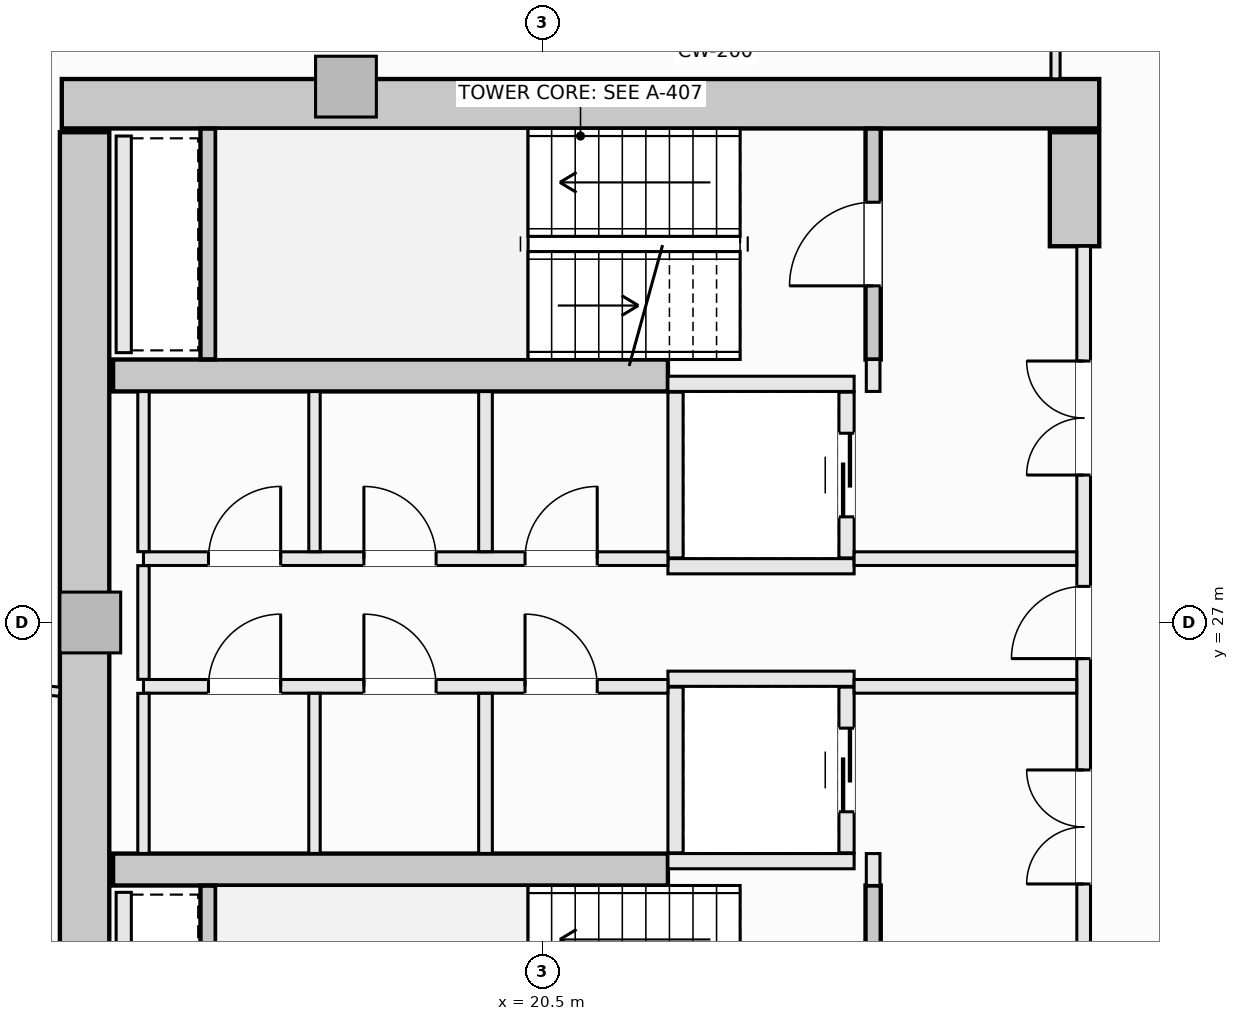
"""IFC4 building model, lengths in metres.
Left out: names, types, materials, properties, quantities, classifications, styles, units other than length and angle.
Written with IfcOpenShell. Run it as: python <this file> out.ifc"""

import sys

from ifc_helpers import new_model, si_unit, direction, frame, frame_2d, origin, origin_2d, place, context, subcontext, project, spatial, rectangle, extrude, element, fill, save


model = new_model("IFC4")
c1 = context("Model", 3, precision=1e-05, world=origin(), true_north=direction((0.0, 1.0)))
c2 = subcontext(c1, "Body", "Model", "MODEL_VIEW")
j1 = project(units=[si_unit("LENGTHUNIT", "METRE"), si_unit("PLANEANGLEUNIT", "RADIAN")], contexts=[c1])
p1 = place(None, origin())
s1 = spatial("IfcSite", under=j1, at=p1, CompositionType="ELEMENT")
p2 = place(p1, origin())
s2 = spatial("IfcBuilding", under=s1, at=p2, CompositionType="ELEMENT")
p3 = place(p2, frame((0.0, 0.0, 112.1)))
s3 = spatial("IfcBuildingStorey", under=s2, at=p3, CompositionType="ELEMENT", Elevation=112.1)
p4 = place(p3, frame((14.175, 33.825, -0.27), z_axis=(0.0, 0.0, 1.0), x_axis=(1.0, 0.0, 0.0)))
e1 = element("IfcWall", 1, at=p4, inside=s3, PredefinedType="SHEAR", context=c2, shape_type="SweptSolid", body=[
    extrude(rectangle(XDim=13.65, YDim=0.65, at=frame_2d((6.825, 0.0))), origin(), (0.0, 0.0, 1.0), 3.4),
])
p5 = place(p3, frame((14.475, 20.55, -0.27), z_axis=(0.0, 0.0, 1.0), x_axis=(0.0, 1.0, 0.0)))
e2 = element("IfcWall", 2, at=p5, inside=s3, PredefinedType="SHEAR", context=c2, shape_type="SweptSolid", body=[
    extrude(rectangle(XDim=12.9, YDim=0.65, at=frame_2d((6.45, 0.0))), origin(), (0.0, 0.0, 1.0), 3.4),
])
p6 = place(p3, frame((27.5, 31.95, -0.27), z_axis=(0.0, 0.0, 1.0), x_axis=(0.0, 1.0, 0.0)))
e3 = element("IfcWall", 3, at=p6, inside=s3, PredefinedType="SHEAR", context=c2, shape_type="SweptSolid", body=[
    extrude(rectangle(XDim=1.5, YDim=0.65, at=frame_2d((0.75, 0.0))), origin(), (0.0, 0.0, 1.0), 3.4),
])
for number, where, z_axis, x_axis in (
    (4, (14.85, 30.25, -0.27), (0.0, 0.0, 1.0), (1.0, 0.0, 0.0)),
    (5, (14.85, 23.75, -0.27), (0.0, 0.0, 1.0), (1.0, 0.0, 0.0)),
):
    element("IfcWall", number, at=place(p3, frame(where, z_axis=z_axis, x_axis=x_axis)), inside=s3, PredefinedType="SHEAR", context=c2, shape_type="SweptSolid", body=[
        extrude(rectangle(XDim=7.3, YDim=0.42, at=frame_2d((3.65, 0.0))), origin(), (0.0, 0.0, 1.0), 3.4),
    ])
for number, where, z_axis, x_axis in (
    (6, (17.914, 34.05, -0.27), (0.0, 0.0, 1.0), (1.0, 0.0, 0.0)),
    (7, (14.55, 27.0, -0.27), (0.0, 0.0, 1.0), (1.0, 0.0, 0.0)),
):
    element("IfcColumn", number, at=place(p3, frame(where, z_axis=z_axis, x_axis=x_axis)), inside=s3, PredefinedType="PILASTER", context=c2, shape_type="SweptSolid", body=[
        extrude(rectangle(XDim=0.8, YDim=0.8, at=origin_2d()), origin(), (0.0, 0.0, 1.0), 3.4),
    ])
p7 = place(p3, frame((24.85, 30.46, -0.27), z_axis=(0.0, 0.0, 1.0), x_axis=(0.0, 1.0, 0.0)))
e8 = element("IfcWall", 8, at=p7, inside=s3, PredefinedType="SHEAR", context=c2, shape_type="SweptSolid", body=[
    extrude(rectangle(XDim=3.038, YDim=0.2, at=frame_2d((1.519, 0.0))), origin(), (0.0, 0.0, 1.0), 3.4),
])
p8 = place(p7, frame((0.969, 0.0, 0.27)))
e9 = element("IfcOpeningElement", 9, at=p8, cuts=e8, PredefinedType="OPENING", context=c2, shape_type="SweptSolid", body=[
    extrude(rectangle(XDim=1.1, YDim=2.15, at=frame_2d((0.55, 1.075))), frame((0.0, 0.11, 0.0), z_axis=(0.0, -1.0, 0.0), x_axis=(1.0, 0.0, 0.0)), (0.0, 0.0, 1.0), 0.22),
])
p9 = place(p3, frame((16.1, 30.462, -0.27), z_axis=(0.0, 0.0, 1.0), x_axis=(0.0, 1.0, 0.0)))
e10 = element("IfcWall", 10, at=p9, inside=s3, PredefinedType="SHEAR", context=c2, shape_type="SweptSolid", body=[
    extrude(rectangle(XDim=3.036, YDim=0.2, at=frame_2d((1.518, 0.0))), origin(), (0.0, 0.0, 1.0), 3.4),
])
p10 = place(p3, frame((24.85, 20.502, -0.27), z_axis=(0.0, 0.0, 1.0), x_axis=(0.0, 1.0, 0.0)))
e11 = element("IfcWall", 11, at=p10, inside=s3, PredefinedType="SHEAR", context=c2, shape_type="SweptSolid", body=[
    extrude(rectangle(XDim=3.038, YDim=0.2, at=frame_2d((1.519, 0.0))), origin(), (0.0, 0.0, 1.0), 3.4),
])
p11 = place(p10, frame((0.969, 0.0, 0.27)))
e12 = element("IfcOpeningElement", 12, at=p11, cuts=e11, PredefinedType="OPENING", context=c2, shape_type="SweptSolid", body=[
    extrude(rectangle(XDim=1.1, YDim=2.15, at=frame_2d((0.55, 1.075))), frame((0.0, 0.11, 0.0), z_axis=(0.0, -1.0, 0.0), x_axis=(1.0, 0.0, 0.0)), (0.0, 0.0, 1.0), 0.22),
])
p12 = place(p3, frame((16.1, 20.502, -0.27), z_axis=(0.0, 0.0, 1.0), x_axis=(0.0, 1.0, 0.0)))
e13 = element("IfcWall", 13, at=p12, inside=s3, PredefinedType="SHEAR", context=c2, shape_type="SweptSolid", body=[
    extrude(rectangle(XDim=3.036, YDim=0.2, at=frame_2d((1.518, 0.0))), origin(), (0.0, 0.0, 1.0), 3.4),
])
for number, where, z_axis, x_axis in (
    (14, (22.15, 30.14, 0.0), (0.0, 0.0, 1.0), (1.0, 0.0, 0.0)),
    (15, (22.15, 27.74, 0.0), (0.0, 0.0, 1.0), (1.0, 0.0, 0.0)),
):
    element("IfcWall", number, at=place(p3, frame(where, z_axis=z_axis, x_axis=x_axis)), inside=s3, PredefinedType="SOLIDWALL", context=c2, shape_type="SweptSolid", body=[
        extrude(rectangle(XDim=2.45, YDim=0.2, at=frame_2d((1.225, 0.0))), origin(), (0.0, 0.0, 1.0), 3.13),
    ])
p13 = place(p3, frame((22.25, 27.85, 0.0), z_axis=(0.0, 0.0, 1.0), x_axis=(0.0, 1.0, 0.0)))
e16 = element("IfcWall", 16, at=p13, inside=s3, PredefinedType="SOLIDWALL", context=c2, shape_type="SweptSolid", body=[
    extrude(rectangle(XDim=2.18, YDim=0.2, at=frame_2d((1.09, 0.0))), origin(), (0.0, 0.0, 1.0), 3.13),
])
p14 = place(p3, frame((24.5, 27.85, 0.0), z_axis=(0.0, 0.0, 1.0), x_axis=(0.0, 1.0, 0.0)))
e17 = element("IfcWall", 17, at=p14, inside=s3, PredefinedType="SOLIDWALL", context=c2, shape_type="SweptSolid", body=[
    extrude(rectangle(XDim=2.18, YDim=0.2, at=frame_2d((1.09, 0.0))), origin(), (0.0, 0.0, 1.0), 3.13),
])
p15 = place(p14, frame((0.54, 0.0, 0.0)))
e18 = element("IfcOpeningElement", 18, at=p15, cuts=e17, PredefinedType="OPENING", context=c2, shape_type="SweptSolid", body=[
    extrude(rectangle(XDim=1.1, YDim=2.2, at=frame_2d((0.55, 1.1))), frame((0.0, 0.11, 0.0), z_axis=(0.0, -1.0, 0.0), x_axis=(1.0, 0.0, 0.0)), (0.0, 0.0, 1.0), 0.22),
])
for number, where, z_axis, x_axis in (
    (19, (22.15, 26.26, 0.0), (0.0, 0.0, 1.0), (1.0, 0.0, 0.0)),
    (20, (22.15, 23.86, 0.0), (0.0, 0.0, 1.0), (1.0, 0.0, 0.0)),
):
    element("IfcWall", number, at=place(p3, frame(where, z_axis=z_axis, x_axis=x_axis)), inside=s3, PredefinedType="SOLIDWALL", context=c2, shape_type="SweptSolid", body=[
        extrude(rectangle(XDim=2.45, YDim=0.2, at=frame_2d((1.225, 0.0))), origin(), (0.0, 0.0, 1.0), 3.13),
    ])
p16 = place(p3, frame((22.25, 23.97, 0.0), z_axis=(0.0, 0.0, 1.0), x_axis=(0.0, 1.0, 0.0)))
e21 = element("IfcWall", 21, at=p16, inside=s3, PredefinedType="SOLIDWALL", context=c2, shape_type="SweptSolid", body=[
    extrude(rectangle(XDim=2.18, YDim=0.2, at=frame_2d((1.09, 0.0))), origin(), (0.0, 0.0, 1.0), 3.13),
])
p17 = place(p3, frame((24.5, 23.97, 0.0), z_axis=(0.0, 0.0, 1.0), x_axis=(0.0, 1.0, 0.0)))
e22 = element("IfcWall", 22, at=p17, inside=s3, PredefinedType="SOLIDWALL", context=c2, shape_type="SweptSolid", body=[
    extrude(rectangle(XDim=2.18, YDim=0.2, at=frame_2d((1.09, 0.0))), origin(), (0.0, 0.0, 1.0), 3.13),
])
p18 = place(p17, frame((0.54, 0.0, 0.0)))
e23 = element("IfcOpeningElement", 23, at=p18, cuts=e22, PredefinedType="OPENING", context=c2, shape_type="SweptSolid", body=[
    extrude(rectangle(XDim=1.1, YDim=2.2, at=frame_2d((0.55, 1.1))), frame((0.0, 0.11, 0.0), z_axis=(0.0, -1.0, 0.0), x_axis=(1.0, 0.0, 0.0)), (0.0, 0.0, 1.0), 0.22),
])
for number, where, z_axis, x_axis in (
    (24, (14.99, 30.55, 0.0), (0.0, 0.0, 1.0), (0.0, 1.0, 0.0)),
    (25, (14.99, 20.6, 0.0), (0.0, 0.0, 1.0), (0.0, 1.0, 0.0)),
):
    element("IfcWall", number, at=place(p3, frame(where, z_axis=z_axis, x_axis=x_axis)), inside=s3, PredefinedType="SOLIDWALL", context=c2, shape_type="SweptSolid", body=[
        extrude(rectangle(XDim=2.85, YDim=0.2, at=frame_2d((1.425, 0.0))), origin(), (0.0, 0.0, 1.0), 3.13),
    ])
for number, where, z_axis, x_axis in (
    (26, (24.85, 23.54, 0.0), (0.0, 0.0, 1.0), (0.0, 1.0, 0.0)),
    (27, (24.85, 30.04, 0.0), (0.0, 0.0, 1.0), (0.0, 1.0, 0.0)),
):
    element("IfcWall", number, at=place(p3, frame(where, z_axis=z_axis, x_axis=x_axis)), inside=s3, PredefinedType="SOLIDWALL", context=c2, shape_type="SweptSolid", body=[
        extrude(rectangle(XDim=0.42, YDim=0.18, at=frame_2d((0.21, 0.0))), origin(), (0.0, 0.0, 1.0), 3.13),
    ])
p19 = place(p3, frame((27.62, 22.05, 0.0), z_axis=(0.0, 0.0, 1.0), x_axis=(0.0, 1.0, 0.0)))
e28 = element("IfcWall", 28, at=p19, inside=s3, PredefinedType="SOLIDWALL", context=c2, shape_type="SweptSolid", body=[
    extrude(rectangle(XDim=9.9, YDim=0.18, at=frame_2d((4.95, 0.0))), origin(), (0.0, 0.0, 1.0), 3.13),
])
p20 = place(p19, frame((4.475, 0.0, 0.0)))
e29 = element("IfcOpeningElement", 29, at=p20, cuts=e28, PredefinedType="OPENING", context=c2, shape_type="SweptSolid", body=[
    extrude(rectangle(XDim=0.95, YDim=2.1, at=frame_2d((0.475, 1.05))), frame((0.0, 0.1, 0.0), z_axis=(0.0, -1.0, 0.0), x_axis=(1.0, 0.0, 0.0)), (0.0, 0.0, 1.0), 0.2),
])
p21 = place(p19, frame((6.89, 0.0, 0.0)))
e30 = element("IfcOpeningElement", 30, at=p21, cuts=e28, PredefinedType="OPENING", context=c2, shape_type="SweptSolid", body=[
    extrude(rectangle(XDim=1.5, YDim=2.2, at=frame_2d((0.75, 1.1))), frame((0.0, 0.1, 0.0), z_axis=(0.0, -1.0, 0.0), x_axis=(1.0, 0.0, 0.0)), (0.0, 0.0, 1.0), 0.2),
])
p22 = place(p19, frame((1.51, 0.0, 0.0)))
e31 = element("IfcOpeningElement", 31, at=p22, cuts=e28, PredefinedType="OPENING", context=c2, shape_type="SweptSolid", body=[
    extrude(rectangle(XDim=1.5, YDim=2.2, at=frame_2d((0.75, 1.1))), frame((0.0, 0.1, 0.0), z_axis=(0.0, -1.0, 0.0), x_axis=(1.0, 0.0, 0.0)), (0.0, 0.0, 1.0), 0.2),
])
p23 = place(p3, frame((15.25, 27.84, 0.0), z_axis=(0.0, 0.0, 1.0), x_axis=(1.0, 0.0, 0.0)))
e32 = element("IfcWall", 32, at=p23, inside=s3, PredefinedType="SOLIDWALL", context=c2, shape_type="SweptSolid", body=[
    extrude(rectangle(XDim=6.9, YDim=0.18, at=frame_2d((3.45, 0.0))), origin(), (0.0, 0.0, 1.0), 3.13),
])
p24 = place(p23, frame((5.02, 0.0, 0.0)))
e33 = element("IfcOpeningElement", 33, at=p24, cuts=e32, PredefinedType="OPENING", context=c2, shape_type="SweptSolid", body=[
    extrude(rectangle(XDim=0.95, YDim=2.1, at=frame_2d((0.475, 1.05))), frame((0.0, 0.1, 0.0), z_axis=(0.0, -1.0, 0.0), x_axis=(1.0, 0.0, 0.0)), (0.0, 0.0, 1.0), 0.2),
])
p25 = place(p23, frame((0.855, 0.0, 0.0)))
e34 = element("IfcOpeningElement", 34, at=p25, cuts=e32, PredefinedType="OPENING", context=c2, shape_type="SweptSolid", body=[
    extrude(rectangle(XDim=0.95, YDim=2.1, at=frame_2d((0.475, 1.05))), frame((0.0, 0.1, 0.0), z_axis=(0.0, -1.0, 0.0), x_axis=(1.0, 0.0, 0.0)), (0.0, 0.0, 1.0), 0.2),
])
p26 = place(p23, frame((2.9, 0.0, 0.0)))
e35 = element("IfcOpeningElement", 35, at=p26, cuts=e32, PredefinedType="OPENING", context=c2, shape_type="SweptSolid", body=[
    extrude(rectangle(XDim=0.95, YDim=2.1, at=frame_2d((0.475, 1.05))), frame((0.0, 0.1, 0.0), z_axis=(0.0, -1.0, 0.0), x_axis=(1.0, 0.0, 0.0)), (0.0, 0.0, 1.0), 0.2),
])
p27 = place(p3, frame((24.6, 27.84, 0.0), z_axis=(0.0, 0.0, 1.0), x_axis=(1.0, 0.0, 0.0)))
e36 = element("IfcWall", 36, at=p27, inside=s3, PredefinedType="SOLIDWALL", context=c2, shape_type="SweptSolid", body=[
    extrude(rectangle(XDim=2.928, YDim=0.18, at=frame_2d((1.464, 0.0))), origin(), (0.0, 0.0, 1.0), 3.13),
])
p28 = place(p3, frame((15.25, 26.16, 0.0), z_axis=(0.0, 0.0, 1.0), x_axis=(1.0, 0.0, 0.0)))
e37 = element("IfcWall", 37, at=p28, inside=s3, PredefinedType="SOLIDWALL", context=c2, shape_type="SweptSolid", body=[
    extrude(rectangle(XDim=6.9, YDim=0.18, at=frame_2d((3.45, 0.0))), origin(), (0.0, 0.0, 1.0), 3.13),
])
p29 = place(p28, frame((5.02, 0.0, 0.0)))
e38 = element("IfcOpeningElement", 38, at=p29, cuts=e37, PredefinedType="OPENING", context=c2, shape_type="SweptSolid", body=[
    extrude(rectangle(XDim=0.95, YDim=2.1, at=frame_2d((0.475, 1.05))), frame((0.0, 0.1, 0.0), z_axis=(0.0, -1.0, 0.0), x_axis=(1.0, 0.0, 0.0)), (0.0, 0.0, 1.0), 0.2),
])
p30 = place(p28, frame((0.855, 0.0, 0.0)))
e39 = element("IfcOpeningElement", 39, at=p30, cuts=e37, PredefinedType="OPENING", context=c2, shape_type="SweptSolid", body=[
    extrude(rectangle(XDim=0.95, YDim=2.1, at=frame_2d((0.475, 1.05))), frame((0.0, 0.1, 0.0), z_axis=(0.0, -1.0, 0.0), x_axis=(1.0, 0.0, 0.0)), (0.0, 0.0, 1.0), 0.2),
])
p31 = place(p28, frame((2.9, 0.0, 0.0)))
e40 = element("IfcOpeningElement", 40, at=p31, cuts=e37, PredefinedType="OPENING", context=c2, shape_type="SweptSolid", body=[
    extrude(rectangle(XDim=0.95, YDim=2.1, at=frame_2d((0.475, 1.05))), frame((0.0, 0.1, 0.0), z_axis=(0.0, -1.0, 0.0), x_axis=(1.0, 0.0, 0.0)), (0.0, 0.0, 1.0), 0.2),
])
p32 = place(p3, frame((24.6, 26.16, 0.0), z_axis=(0.0, 0.0, 1.0), x_axis=(1.0, 0.0, 0.0)))
e41 = element("IfcWall", 41, at=p32, inside=s3, PredefinedType="SOLIDWALL", context=c2, shape_type="SweptSolid", body=[
    extrude(rectangle(XDim=2.928, YDim=0.18, at=frame_2d((1.464, 0.0))), origin(), (0.0, 0.0, 1.0), 3.13),
])
p33 = place(p3, frame((15.25, 23.962, 0.0), z_axis=(0.0, 0.0, 1.0), x_axis=(0.0, 1.0, 0.0)))
e42 = element("IfcWall", 42, at=p33, inside=s3, PredefinedType="PARTITIONING", context=c2, shape_type="SweptSolid", body=[
    extrude(rectangle(XDim=2.106, YDim=0.15, at=frame_2d((1.053, 0.0))), origin(), (0.0, 0.0, 1.0), 3.13),
])
p34 = place(p3, frame((15.25, 26.252, 0.0), z_axis=(0.0, 0.0, 1.0), x_axis=(0.0, 1.0, 0.0)))
e43 = element("IfcWall", 43, at=p34, inside=s3, PredefinedType="PARTITIONING", context=c2, shape_type="SweptSolid", body=[
    extrude(rectangle(XDim=1.496, YDim=0.15, at=frame_2d((0.748, 0.0))), origin(), (0.0, 0.0, 1.0), 3.13),
])
p35 = place(p3, frame((15.25, 27.932, 0.0), z_axis=(0.0, 0.0, 1.0), x_axis=(0.0, 1.0, 0.0)))
e44 = element("IfcWall", 44, at=p35, inside=s3, PredefinedType="PARTITIONING", context=c2, shape_type="SweptSolid", body=[
    extrude(rectangle(XDim=2.106, YDim=0.15, at=frame_2d((1.053, 0.0))), origin(), (0.0, 0.0, 1.0), 3.13),
])
for number, where, z_axis, x_axis in (
    (45, (19.75, 23.962, 0.0), (0.0, 0.0, 1.0), (0.0, 1.0, 0.0)),
    (46, (19.75, 27.932, 0.0), (0.0, 0.0, 1.0), (0.0, 1.0, 0.0)),
):
    element("IfcWall", number, at=place(p3, frame(where, z_axis=z_axis, x_axis=x_axis)), inside=s3, PredefinedType="SOLIDWALL", context=c2, shape_type="SweptSolid", body=[
        extrude(rectangle(XDim=2.106, YDim=0.18, at=frame_2d((1.053, 0.0))), origin(), (0.0, 0.0, 1.0), 3.13),
    ])
for number, where, z_axis, x_axis in (
    (47, (17.5, 23.962, 0.0), (0.0, 0.0, 1.0), (0.0, 1.0, 0.0)),
    (48, (17.5, 27.932, 0.0), (0.0, 0.0, 1.0), (0.0, 1.0, 0.0)),
):
    element("IfcWall", number, at=place(p3, frame(where, z_axis=z_axis, x_axis=x_axis)), inside=s3, PredefinedType="PARTITIONING", context=c2, shape_type="SweptSolid", body=[
        extrude(rectangle(XDim=2.106, YDim=0.15, at=frame_2d((1.053, 0.0))), origin(), (0.0, 0.0, 1.0), 3.13),
    ])
p36 = place(p3, frame((27.25, 34.152, 0.0), z_axis=(0.0, 0.0, 1.0), x_axis=(0.0, 1.0, 0.0)))
e49 = element("IfcWall", 49, at=p36, inside=s3, PredefinedType="PARTITIONING", context=c2, shape_type="SweptSolid", body=[
    extrude(rectangle(XDim=0.806, YDim=0.12, at=frame_2d((0.403, 0.0))), origin(), (0.0, 0.0, 1.0), 3.13),
])
p37 = place(p3, frame((6.095, 26.981, 0.0), z_axis=(0.0, 0.0, 1.0), x_axis=(0.993917127708, -0.11013057363, 0.0)))
e50 = element("IfcWall", 50, at=p37, inside=s3, PredefinedType="PARTITIONING", context=c2, shape_type="SweptSolid", body=[
    extrude(rectangle(XDim=8.103, YDim=0.12, at=frame_2d((4.051, 0.0))), origin(), (0.0, 0.0, 1.0), 2.505),
])
p38 = place(p8, origin())
e51 = element("IfcDoor", 51, at=p38, inside=s3, OperationType="SINGLE_SWING_LEFT", PredefinedType="DOOR", context=c2, shape_type="SweptSolid", body=[
    extrude(rectangle(XDim=1.1, YDim=2.15, at=frame_2d((0.55, 1.075))), frame((0.0, 0.025, 0.0), z_axis=(0.0, -1.0, 0.0), x_axis=(1.0, 0.0, 0.0)), (0.0, 0.0, 1.0), 0.05),
])
fill(e9, e51)
p39 = place(p15, origin())
e52 = element("IfcDoor", 52, at=p39, inside=s3, OperationType="SLIDING_TO_LEFT", PredefinedType="DOOR", context=c2, shape_type="SweptSolid", body=[
    extrude(rectangle(XDim=1.1, YDim=2.2, at=frame_2d((0.55, 1.1))), frame((0.0, 0.025, 0.0), z_axis=(0.0, -1.0, 0.0), x_axis=(1.0, 0.0, 0.0)), (0.0, 0.0, 1.0), 0.05),
])
fill(e18, e52)
p40 = place(p18, origin())
e53 = element("IfcDoor", 53, at=p40, inside=s3, OperationType="SLIDING_TO_LEFT", PredefinedType="DOOR", context=c2, shape_type="SweptSolid", body=[
    extrude(rectangle(XDim=1.1, YDim=2.2, at=frame_2d((0.55, 1.1))), frame((0.0, 0.025, 0.0), z_axis=(0.0, -1.0, 0.0), x_axis=(1.0, 0.0, 0.0)), (0.0, 0.0, 1.0), 0.05),
])
fill(e23, e53)
p41 = place(p20, origin())
e54 = element("IfcDoor", 54, at=p41, inside=s3, OperationType="SINGLE_SWING_LEFT", PredefinedType="DOOR", context=c2, shape_type="SweptSolid", body=[
    extrude(rectangle(XDim=0.95, YDim=2.1, at=frame_2d((0.475, 1.05))), frame((0.0, 0.025, 0.0), z_axis=(0.0, -1.0, 0.0), x_axis=(1.0, 0.0, 0.0)), (0.0, 0.0, 1.0), 0.05),
])
fill(e29, e54)
p42 = place(p21, origin())
e55 = element("IfcDoor", 55, at=p42, inside=s3, OperationType="DOUBLE_DOOR_SINGLE_SWING", PredefinedType="DOOR", context=c2, shape_type="SweptSolid", body=[
    extrude(rectangle(XDim=1.5, YDim=2.2, at=frame_2d((0.75, 1.1))), frame((0.0, 0.025, 0.0), z_axis=(0.0, -1.0, 0.0), x_axis=(1.0, 0.0, 0.0)), (0.0, 0.0, 1.0), 0.05),
])
fill(e30, e55)
p43 = place(p22, origin())
e56 = element("IfcDoor", 56, at=p43, inside=s3, OperationType="DOUBLE_DOOR_SINGLE_SWING", PredefinedType="DOOR", context=c2, shape_type="SweptSolid", body=[
    extrude(rectangle(XDim=1.5, YDim=2.2, at=frame_2d((0.75, 1.1))), frame((0.0, 0.025, 0.0), z_axis=(0.0, -1.0, 0.0), x_axis=(1.0, 0.0, 0.0)), (0.0, 0.0, 1.0), 0.05),
])
fill(e31, e56)
p44 = place(p24, origin())
e57 = element("IfcDoor", 57, at=p44, inside=s3, OperationType="SINGLE_SWING_RIGHT", PredefinedType="DOOR", context=c2, shape_type="SweptSolid", body=[
    extrude(rectangle(XDim=0.95, YDim=2.1, at=frame_2d((0.475, 1.05))), frame((0.0, 0.025, 0.0), z_axis=(0.0, -1.0, 0.0), x_axis=(1.0, 0.0, 0.0)), (0.0, 0.0, 1.0), 0.05),
])
fill(e33, e57)
p45 = place(p29, origin())
e58 = element("IfcDoor", 58, at=p45, inside=s3, OperationType="SINGLE_SWING_LEFT", PredefinedType="DOOR", context=c2, shape_type="SweptSolid", body=[
    extrude(rectangle(XDim=0.95, YDim=2.1, at=frame_2d((0.475, 1.05))), frame((0.0, 0.025, 0.0), z_axis=(0.0, -1.0, 0.0), x_axis=(1.0, 0.0, 0.0)), (0.0, 0.0, 1.0), 0.05),
])
fill(e38, e58)
p46 = place(p25, origin())
e59 = element("IfcDoor", 59, at=p46, inside=s3, OperationType="SINGLE_SWING_RIGHT", PredefinedType="DOOR", context=c2, shape_type="SweptSolid", body=[
    extrude(rectangle(XDim=0.95, YDim=2.1, at=frame_2d((0.475, 1.05))), frame((0.0, 0.025, 0.0), z_axis=(0.0, -1.0, 0.0), x_axis=(1.0, 0.0, 0.0)), (0.0, 0.0, 1.0), 0.05),
])
fill(e34, e59)
p47 = place(p26, origin())
e60 = element("IfcDoor", 60, at=p47, inside=s3, OperationType="SINGLE_SWING_LEFT", PredefinedType="DOOR", context=c2, shape_type="SweptSolid", body=[
    extrude(rectangle(XDim=0.95, YDim=2.1, at=frame_2d((0.475, 1.05))), frame((0.0, 0.025, 0.0), z_axis=(0.0, -1.0, 0.0), x_axis=(1.0, 0.0, 0.0)), (0.0, 0.0, 1.0), 0.05),
])
fill(e35, e60)
p48 = place(p30, origin())
e61 = element("IfcDoor", 61, at=p48, inside=s3, OperationType="SINGLE_SWING_RIGHT", PredefinedType="DOOR", context=c2, shape_type="SweptSolid", body=[
    extrude(rectangle(XDim=0.95, YDim=2.1, at=frame_2d((0.475, 1.05))), frame((0.0, 0.025, 0.0), z_axis=(0.0, -1.0, 0.0), x_axis=(1.0, 0.0, 0.0)), (0.0, 0.0, 1.0), 0.05),
])
fill(e39, e61)
p49 = place(p31, origin())
e62 = element("IfcDoor", 62, at=p49, inside=s3, OperationType="SINGLE_SWING_LEFT", PredefinedType="DOOR", context=c2, shape_type="SweptSolid", body=[
    extrude(rectangle(XDim=0.95, YDim=2.1, at=frame_2d((0.475, 1.05))), frame((0.0, 0.025, 0.0), z_axis=(0.0, -1.0, 0.0), x_axis=(1.0, 0.0, 0.0)), (0.0, 0.0, 1.0), 0.05),
])
fill(e40, e62)
save(model, sys.argv[1])
